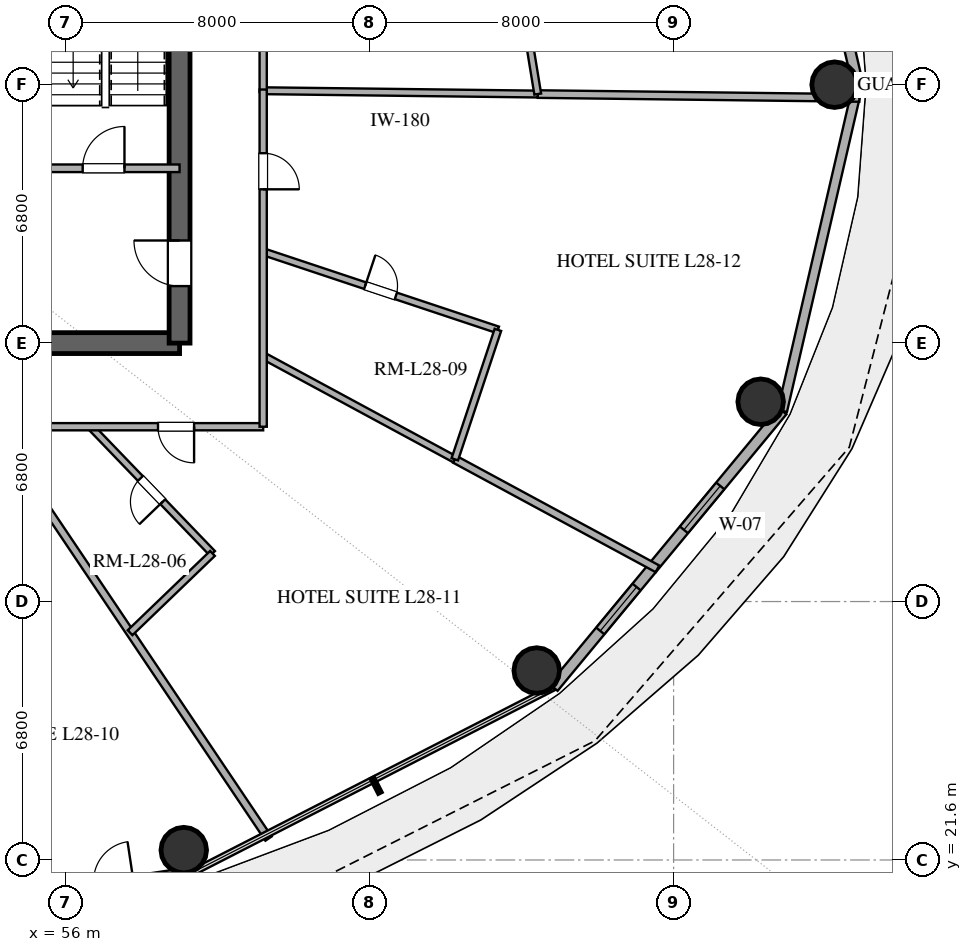
"""IFC4 building model, lengths in metres.
Left out: names, types, materials, properties, quantities, classifications, styles, units other than length and angle.
Written with IfcOpenShell. Run it as: python <this file> out.ifc"""

import sys

from ifc_helpers import new_model, si_unit, direction, frame, frame_2d, origin, origin_2d, place, context, subcontext, project, spatial, rectangle, hollow_circle, extrude, element, fill, save


model = new_model("IFC4")
c1 = context("Model", 3, precision=1e-05, world=origin(), true_north=direction((0.0, 1.0)))
c2 = subcontext(c1, "Body", "Model", "MODEL_VIEW")
j1 = project(units=[si_unit("LENGTHUNIT", "METRE"), si_unit("PLANEANGLEUNIT", "RADIAN")], contexts=[c1])
p1 = place(None, origin())
s1 = spatial("IfcSite", under=j1, at=p1, CompositionType="ELEMENT")
p2 = place(p1, origin())
s2 = spatial("IfcBuilding", under=s1, at=p2, CompositionType="ELEMENT")
p3 = place(p2, frame((0.0, 0.0, 112.8)))
s3 = spatial("IfcBuildingStorey", under=s2, at=p3, CompositionType="ELEMENT", Elevation=112.8)
p4 = place(p3, frame((55.0, 35.2, 0.0), z_axis=(0.0, 0.0, 1.0), x_axis=(1.0, 0.0, 0.0)))
e1 = element("IfcWall", 1, at=p4, inside=s3, PredefinedType="SHEAR", context=c2, shape_type="SweptSolid", body=[
    extrude(rectangle(XDim=4.0, YDim=0.55, at=frame_2d((2.0, 0.0))), origin(), (0.0, 0.0, 1.0), 3.38),
])
p5 = place(p3, frame((59.0, 35.2, 0.0), z_axis=(0.0, 0.0, 1.0), x_axis=(0.0, 1.0, 0.0)))
e2 = element("IfcWall", 2, at=p5, inside=s3, PredefinedType="SHEAR", context=c2, shape_type="SweptSolid", body=[
    extrude(rectangle(XDim=13.6, YDim=0.55, at=frame_2d((6.8, 0.0))), origin(), (0.0, 0.0, 1.0), 3.38),
])
p6 = place(p5, frame((1.5, 0.0, 0.0)))
e3 = element("IfcOpeningElement", 3, at=p6, cuts=e2, PredefinedType="OPENING", context=c2, shape_type="SweptSolid", body=[
    extrude(rectangle(XDim=1.2, YDim=2.15, at=frame_2d((0.6, 1.075))), frame((0.0, 0.285, 0.0), z_axis=(0.0, -1.0, 0.0), x_axis=(1.0, 0.0, 0.0)), (0.0, 0.0, 1.0), 0.57),
])
for number, where, z_axis, x_axis in (
    (4, (76.237, 42.0, 0.0), (0.0, 0.0, 1.0), (1.0, 0.0, 0.0)),
    (5, (59.11, 21.859, 0.0), (0.0, 0.0, 1.0), (1.0, 0.0, 0.0)),
    (6, (68.398, 26.585, 0.0), (0.0, 0.0, 1.0), (1.0, 0.0, 0.0)),
    (7, (74.291, 33.657, 0.0), (0.0, 0.0, 1.0), (1.0, 0.0, 0.0)),
):
    element("IfcColumn", number, at=place(p3, frame(where, z_axis=z_axis, x_axis=x_axis)), inside=s3, PredefinedType="COLUMN", context=c2, shape_type="SweptSolid", body=[
        extrude(hollow_circle(Radius=0.6, WallThickness=0.032, at=origin_2d()), origin(), (0.0, 0.0, 1.0), 3.38),
    ])
p7 = place(p3, frame((76.849, 42.0, 0.0), z_axis=(0.0, 0.0, 1.0), x_axis=(-0.22558597182, 0.974223264616, 0.0)))
e8 = element("IfcWall", 8, at=p7, inside=s3, PredefinedType="SOLIDWALL", context=c2, shape_type="SweptSolid", body=[
    extrude(rectangle(XDim=8.811, YDim=0.28, at=frame_2d((4.405, 0.0))), origin(), (0.0, 0.0, 1.0), 3.38),
])
p8 = place(p7, frame((5.675, 0.0, 0.0)))
e9 = element("IfcOpeningElement", 9, at=p8, cuts=e8, PredefinedType="OPENING", context=c2, shape_type="SweptSolid", body=[
    extrude(rectangle(XDim=1.6, YDim=2.25, at=frame_2d((0.8, 1.125))), frame((0.0, 0.15, 0.0), z_axis=(0.0, -1.0, 0.0), x_axis=(1.0, 0.0, 0.0)), (0.0, 0.0, 1.0), 0.3),
])
p9 = place(p3, frame((48.0, 19.57, 0.0), z_axis=(0.0, 0.0, 1.0), x_axis=(0.988877774656, 0.148730450117, 0.0)))
e10 = element("IfcWall", 10, at=p9, inside=s3, PredefinedType="SOLIDWALL", context=c2, shape_type="SweptSolid", body=[
    extrude(rectangle(XDim=11.479, YDim=0.28, at=frame_2d((5.74, 0.0))), origin(), (0.0, 0.0, 1.0), 3.38),
])
p10 = place(p9, frame((8.847, 0.0, 0.0)))
e11 = element("IfcOpeningElement", 11, at=p10, cuts=e10, PredefinedType="OPENING", context=c2, shape_type="SweptSolid", body=[
    extrude(rectangle(XDim=1.05, YDim=2.2, at=frame_2d((0.525, 1.1))), frame((0.0, 0.15, 0.0), z_axis=(0.0, -1.0, 0.0), x_axis=(1.0, 0.0, 0.0)), (0.0, 0.0, 1.0), 0.3),
])
p11 = place(p3, frame((68.84, 26.14, 0.0), z_axis=(0.0, 0.0, 1.0), x_axis=(0.637505817448, 0.770445541696, 0.0)))
e12 = element("IfcWall", 12, at=p11, inside=s3, PredefinedType="SOLIDWALL", context=c2, shape_type="SweptSolid", body=[
    extrude(rectangle(XDim=9.445, YDim=0.28, at=frame_2d((4.723, 0.0))), origin(), (0.0, 0.0, 1.0), 3.38),
])
p12 = place(p11, frame((1.93, 0.0, 0.85)))
e13 = element("IfcOpeningElement", 13, at=p12, cuts=e12, PredefinedType="OPENING", context=c2, shape_type="SweptSolid", body=[
    extrude(rectangle(XDim=1.5, YDim=2.0, at=frame_2d((0.75, 1.0))), frame((0.0, 0.15, 0.0), z_axis=(0.0, -1.0, 0.0), x_axis=(1.0, 0.0, 0.0)), (0.0, 0.0, 1.0), 0.3),
])
p13 = place(p11, frame((5.383, 0.0, 0.85)))
e14 = element("IfcOpeningElement", 14, at=p13, cuts=e12, PredefinedType="OPENING", context=c2, shape_type="SweptSolid", body=[
    extrude(rectangle(XDim=1.5, YDim=1.8, at=frame_2d((0.75, 0.9))), frame((0.0, 0.15, 0.0), z_axis=(0.0, -1.0, 0.0), x_axis=(1.0, 0.0, 0.0)), (0.0, 0.0, 1.0), 0.3),
])
p14 = place(p3, frame((74.861, 33.417, 0.0), z_axis=(0.0, 0.0, 1.0), x_axis=(0.22558597182, 0.974223264616, 0.0)))
e15 = element("IfcWall", 15, at=p14, inside=s3, PredefinedType="SOLIDWALL", context=c2, shape_type="SweptSolid", body=[
    extrude(rectangle(XDim=8.811, YDim=0.25, at=frame_2d((4.405, 0.0))), origin(), (0.0, 0.0, 1.0), 3.38),
])
p15 = place(p3, frame((55.0, 39.8, 0.0), z_axis=(0.0, 0.0, 1.0), x_axis=(1.0, 0.0, 0.0)))
e16 = element("IfcWall", 16, at=p15, inside=s3, PredefinedType="SOLIDWALL", context=c2, shape_type="SweptSolid", body=[
    extrude(rectangle(XDim=4.0, YDim=0.2, at=frame_2d((2.0, 0.0))), origin(), (0.0, 0.0, 1.0), 2.74),
])
p16 = place(p15, frame((1.45, 0.0, 0.0)))
e17 = element("IfcOpeningElement", 17, at=p16, cuts=e16, PredefinedType="OPENING", context=c2, shape_type="SweptSolid", body=[
    extrude(rectangle(XDim=1.1, YDim=2.15, at=frame_2d((0.55, 1.075))), frame((0.0, 0.11, 0.0), z_axis=(0.0, -1.0, 0.0), x_axis=(1.0, 0.0, 0.0)), (0.0, 0.0, 1.0), 0.22),
])
p17 = place(p3, frame((76.888, 41.651, 0.0), z_axis=(0.0, 0.0, 1.0), x_axis=(-0.9999269672, 0.012085539541, 0.0)))
e18 = element("IfcWall", 18, at=p17, inside=s3, PredefinedType="PARTITIONING", context=c2, shape_type="SweptSolid", body=[
    extrude(rectangle(XDim=8.464, YDim=0.2, at=frame_2d((4.232, 0.0))), origin(), (0.0, 0.0, 1.0), 2.74),
])
p18 = place(p3, frame((68.425, 41.753, 0.0), z_axis=(0.0, 0.0, 1.0), x_axis=(-0.999926833816, 0.012096570355, 0.0)))
e19 = element("IfcWall", 19, at=p18, inside=s3, PredefinedType="PLUMBINGWALL", context=c2, shape_type="SweptSolid", body=[
    extrude(rectangle(XDim=7.225, YDim=0.18, at=frame_2d((3.613, 0.0))), origin(), (0.0, 0.0, 1.0), 2.74),
])
p19 = place(p3, frame((54.053, 33.0, 0.0), z_axis=(0.0, 0.0, 1.0), x_axis=(0.558073496329, -0.829791523634, 0.0)))
e20 = element("IfcWall", 20, at=p19, inside=s3, PredefinedType="PARTITIONING", context=c2, shape_type="SweptSolid", body=[
    extrude(rectangle(XDim=13.06, YDim=0.2, at=frame_2d((6.53, 0.0))), origin(), (0.0, 0.0, 1.0), 2.74),
])
p20 = place(p3, frame((61.2, 37.605, 0.0), z_axis=(0.0, 0.0, 1.0), x_axis=(0.948788249983, -0.315912735884, 0.0)))
e21 = element("IfcWall", 21, at=p20, inside=s3, PredefinedType="PLUMBINGWALL", context=c2, shape_type="SweptSolid", body=[
    extrude(rectangle(XDim=6.51, YDim=0.18, at=frame_2d((3.255, 0.0))), origin(), (0.0, 0.0, 1.0), 2.74),
])
p21 = place(p20, frame((2.83, 0.0, 0.0)))
e22 = element("IfcOpeningElement", 22, at=p21, cuts=e21, PredefinedType="OPENING", context=c2, shape_type="SweptSolid", body=[
    extrude(rectangle(XDim=0.85, YDim=2.1, at=frame_2d((0.425, 1.05))), frame((0.0, 0.1, 0.0), z_axis=(0.0, -1.0, 0.0), x_axis=(1.0, 0.0, 0.0)), (0.0, 0.0, 1.0), 0.2),
])
p22 = place(p3, frame((71.576, 29.261, 0.0), z_axis=(0.0, 0.0, 1.0), x_axis=(-0.879774354245, 0.475391507721, 0.0)))
e23 = element("IfcWall", 23, at=p22, inside=s3, PredefinedType="PARTITIONING", context=c2, shape_type="SweptSolid", body=[
    extrude(rectangle(XDim=6.062, YDim=0.2, at=frame_2d((3.031, 0.0))), origin(), (0.0, 0.0, 1.0), 2.74),
])
p23 = place(p3, frame((66.243, 32.143, 0.0), z_axis=(0.0, 0.0, 1.0), x_axis=(-0.879784992633, 0.475371819461, 0.0)))
e24 = element("IfcWall", 24, at=p23, inside=s3, PredefinedType="PLUMBINGWALL", context=c2, shape_type="SweptSolid", body=[
    extrude(rectangle(XDim=5.732, YDim=0.18, at=frame_2d((2.866, 0.0))), origin(), (0.0, 0.0, 1.0), 2.74),
])
p24 = place(p3, frame((59.866, 29.666, 0.0), z_axis=(0.0, 0.0, 1.0), x_axis=(-0.693306956927, 0.720642396392, 0.0)))
e25 = element("IfcWall", 25, at=p24, inside=s3, PredefinedType="PLUMBINGWALL", context=c2, shape_type="SweptSolid", body=[
    extrude(rectangle(XDim=4.626, YDim=0.18, at=frame_2d((2.313, 0.0))), origin(), (0.0, 0.0, 1.0), 2.74),
])
p25 = place(p24, frame((1.888, 0.0, 0.0)))
e26 = element("IfcOpeningElement", 26, at=p25, cuts=e25, PredefinedType="OPENING", context=c2, shape_type="SweptSolid", body=[
    extrude(rectangle(XDim=0.85, YDim=2.1, at=frame_2d((0.425, 1.05))), frame((0.0, 0.1, 0.0), z_axis=(0.0, -1.0, 0.0), x_axis=(1.0, 0.0, 0.0)), (0.0, 0.0, 1.0), 0.2),
])
p26 = place(p3, frame((61.2, 33.0, 0.0), z_axis=(0.0, 0.0, 1.0), x_axis=(-1.0, 0.0, 0.0)))
e27 = element("IfcWall", 27, at=p26, inside=s3, PredefinedType="PARTITIONING", context=c2, shape_type="SweptSolid", body=[
    extrude(rectangle(XDim=7.186, YDim=0.19, at=frame_2d((3.593, 0.0))), origin(), (0.0, 0.0, 1.0), 2.74),
])
p27 = place(p26, frame((1.818, 0.0, 0.0)))
e28 = element("IfcOpeningElement", 28, at=p27, cuts=e27, PredefinedType="OPENING", context=c2, shape_type="SweptSolid", body=[
    extrude(rectangle(XDim=0.95, YDim=2.15, at=frame_2d((0.475, 1.075))), frame((0.0, 0.105, 0.0), z_axis=(0.0, -1.0, 0.0), x_axis=(1.0, 0.0, 0.0)), (0.0, 0.0, 1.0), 0.21),
])
p28 = place(p3, frame((61.2, 41.809, 0.0), z_axis=(0.0, 0.0, 1.0), x_axis=(0.0, 1.0, 0.0)))
e29 = element("IfcWall", 29, at=p28, inside=s3, PredefinedType="PARTITIONING", context=c2, shape_type="SweptSolid", body=[
    extrude(rectangle(XDim=6.917, YDim=0.19, at=frame_2d((3.458, 0.0))), origin(), (0.0, 0.0, 1.0), 2.74),
])
p29 = place(p28, frame((4.157, 0.0, 0.0)))
e30 = element("IfcOpeningElement", 30, at=p29, cuts=e29, PredefinedType="OPENING", context=c2, shape_type="SweptSolid", body=[
    extrude(rectangle(XDim=0.95, YDim=2.15, at=frame_2d((0.475, 1.075))), frame((0.0, 0.105, 0.0), z_axis=(0.0, -1.0, 0.0), x_axis=(1.0, 0.0, 0.0)), (0.0, 0.0, 1.0), 0.21),
])
p30 = place(p3, frame((61.2, 41.873, 0.0), z_axis=(0.0, 0.0, 1.0), x_axis=(0.0, -1.0, 0.0)))
e31 = element("IfcWall", 31, at=p30, inside=s3, PredefinedType="PARTITIONING", context=c2, shape_type="SweptSolid", body=[
    extrude(rectangle(XDim=8.873, YDim=0.19, at=frame_2d((4.436, 0.0))), origin(), (0.0, 0.0, 1.0), 2.74),
])
p31 = place(p30, frame((1.676, 0.0, 0.0)))
e32 = element("IfcOpeningElement", 32, at=p31, cuts=e31, PredefinedType="OPENING", context=c2, shape_type="SweptSolid", body=[
    extrude(rectangle(XDim=0.95, YDim=2.15, at=frame_2d((0.475, 1.075))), frame((0.0, 0.105, 0.0), z_axis=(0.0, -1.0, 0.0), x_axis=(1.0, 0.0, 0.0)), (0.0, 0.0, 1.0), 0.21),
])
p32 = place(p3, frame((67.377, 35.548, 0.0), z_axis=(0.0, 0.0, 1.0), x_axis=(-0.315860462711, -0.948805653491, 0.0)))
e33 = element("IfcWall", 33, at=p32, inside=s3, PredefinedType="PLUMBINGWALL", context=c2, shape_type="SweptSolid", body=[
    extrude(rectangle(XDim=3.59, YDim=0.18, at=frame_2d((1.795, 0.0))), origin(), (0.0, 0.0, 1.0), 2.74),
])
p33 = place(p3, frame((67.855, 45.243, 0.0), z_axis=(0.0, 0.0, 1.0), x_axis=(0.161207379819, -0.986920554397, 0.0)))
e34 = element("IfcWall", 34, at=p33, inside=s3, PredefinedType="PLUMBINGWALL", context=c2, shape_type="SweptSolid", body=[
    extrude(rectangle(XDim=3.536, YDim=0.18, at=frame_2d((1.768, 0.0))), origin(), (0.0, 0.0, 1.0), 2.74),
])
p34 = place(p3, frame((57.698, 27.58, 0.0), z_axis=(0.0, 0.0, 1.0), x_axis=(0.720688028056, 0.693259522991, 0.0)))
e35 = element("IfcWall", 35, at=p34, inside=s3, PredefinedType="PLUMBINGWALL", context=c2, shape_type="SweptSolid", body=[
    extrude(rectangle(XDim=3.009, YDim=0.18, at=frame_2d((1.504, 0.0))), origin(), (0.0, 0.0, 1.0), 2.74),
])
p35 = place(p12, origin())
e36 = element("IfcWindow", 36, at=p35, inside=s3, PartitioningType="SINGLE_PANEL", PredefinedType="WINDOW", context=c2, shape_type="SweptSolid", body=[
    extrude(rectangle(XDim=1.5, YDim=2.0, at=frame_2d((0.75, 1.0))), frame((0.0, 0.03, 0.0), z_axis=(0.0, -1.0, 0.0), x_axis=(1.0, 0.0, 0.0)), (0.0, 0.0, 1.0), 0.06),
])
fill(e13, e36)
p36 = place(p13, origin())
e37 = element("IfcWindow", 37, at=p36, inside=s3, PartitioningType="SINGLE_PANEL", PredefinedType="WINDOW", context=c2, shape_type="SweptSolid", body=[
    extrude(rectangle(XDim=1.5, YDim=1.8, at=frame_2d((0.75, 0.9))), frame((0.0, 0.03, 0.0), z_axis=(0.0, -1.0, 0.0), x_axis=(1.0, 0.0, 0.0)), (0.0, 0.0, 1.0), 0.06),
])
fill(e14, e37)
p37 = place(p6, origin())
e38 = element("IfcDoor", 38, at=p37, inside=s3, OperationType="SINGLE_SWING_RIGHT", PredefinedType="DOOR", context=c2, shape_type="SweptSolid", body=[
    extrude(rectangle(XDim=1.2, YDim=2.15, at=frame_2d((0.6, 1.075))), frame((0.0, 0.025, 0.0), z_axis=(0.0, -1.0, 0.0), x_axis=(1.0, 0.0, 0.0)), (0.0, 0.0, 1.0), 0.05),
])
fill(e3, e38)
p38 = place(p16, origin())
e39 = element("IfcDoor", 39, at=p38, inside=s3, OperationType="SINGLE_SWING_RIGHT", PredefinedType="DOOR", context=c2, shape_type="SweptSolid", body=[
    extrude(rectangle(XDim=1.1, YDim=2.15, at=frame_2d((0.55, 1.075))), frame((0.0, 0.025, 0.0), z_axis=(0.0, -1.0, 0.0), x_axis=(1.0, 0.0, 0.0)), (0.0, 0.0, 1.0), 0.05),
])
fill(e17, e39)
p39 = place(p21, origin())
e40 = element("IfcDoor", 40, at=p39, inside=s3, OperationType="SINGLE_SWING_LEFT", PredefinedType="DOOR", context=c2, shape_type="SweptSolid", body=[
    extrude(rectangle(XDim=0.85, YDim=2.1, at=frame_2d((0.425, 1.05))), frame((0.0, 0.025, 0.0), z_axis=(0.0, -1.0, 0.0), x_axis=(1.0, 0.0, 0.0)), (0.0, 0.0, 1.0), 0.05),
])
fill(e22, e40)
p40 = place(p25, origin())
e41 = element("IfcDoor", 41, at=p40, inside=s3, OperationType="SINGLE_SWING_LEFT", PredefinedType="DOOR", context=c2, shape_type="SweptSolid", body=[
    extrude(rectangle(XDim=0.85, YDim=2.1, at=frame_2d((0.425, 1.05))), frame((0.0, 0.025, 0.0), z_axis=(0.0, -1.0, 0.0), x_axis=(1.0, 0.0, 0.0)), (0.0, 0.0, 1.0), 0.05),
])
fill(e26, e41)
p41 = place(p27, origin())
e42 = element("IfcDoor", 42, at=p41, inside=s3, OperationType="SINGLE_SWING_LEFT", PredefinedType="DOOR", context=c2, shape_type="SweptSolid", body=[
    extrude(rectangle(XDim=0.95, YDim=2.15, at=frame_2d((0.475, 1.075))), frame((0.0, 0.025, 0.0), z_axis=(0.0, -1.0, 0.0), x_axis=(1.0, 0.0, 0.0)), (0.0, 0.0, 1.0), 0.05),
])
fill(e28, e42)
p42 = place(p31, origin())
e43 = element("IfcDoor", 43, at=p42, inside=s3, OperationType="SINGLE_SWING_RIGHT", PredefinedType="DOOR", context=c2, shape_type="SweptSolid", body=[
    extrude(rectangle(XDim=0.95, YDim=2.15, at=frame_2d((0.475, 1.075))), frame((0.0, 0.025, 0.0), z_axis=(0.0, -1.0, 0.0), x_axis=(1.0, 0.0, 0.0)), (0.0, 0.0, 1.0), 0.05),
])
fill(e32, e43)
save(model, sys.argv[1])
